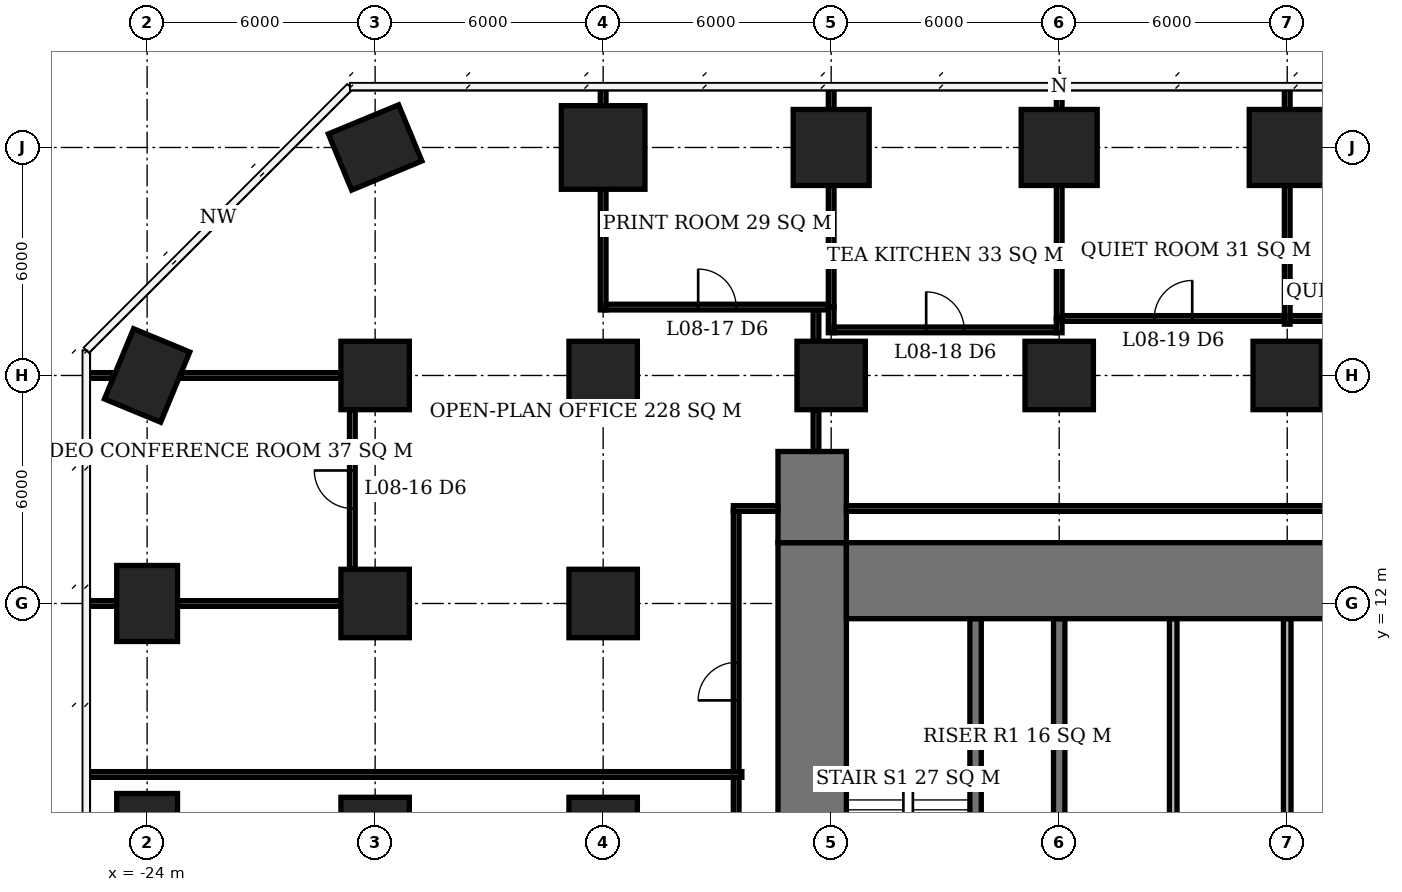
"""IFC4 building model, lengths in metres.
Left out: names, types, materials, properties, quantities, classifications, styles, units other than length and angle.
Written with IfcOpenShell. Run it as: python <this file> out.ifc"""

import sys

from ifc_helpers import new_model, si_unit, direction, frame, frame_2d, origin, origin_2d, place, context, subcontext, project, spatial, rectangle, extrude, element, fill, save


model = new_model("IFC4")
c1 = context("Model", 3, precision=1e-05, world=origin(), true_north=direction((0.0, 1.0)))
c2 = subcontext(c1, "Body", "Model", "MODEL_VIEW")
j1 = project(units=[si_unit("LENGTHUNIT", "METRE"), si_unit("PLANEANGLEUNIT", "RADIAN")], contexts=[c1])
p1 = place(None, origin())
s1 = spatial("IfcSite", under=j1, at=p1, CompositionType="ELEMENT")
p2 = place(p1, origin())
s2 = spatial("IfcBuilding", under=s1, at=p2, CompositionType="ELEMENT")
p3 = place(p2, frame((0.0, 0.0, 37.7)))
s3 = spatial("IfcBuildingStorey", under=s2, at=p3, CompositionType="ELEMENT", Elevation=37.7)
for number, where, z_axis, x_axis in (
    (1, (-24.0, 6.0, 0.0), (0.0, 0.0, 1.0), (0.0, 1.0, 0.0)),
    (2, (-24.0, 12.0, 0.0), (0.0, 0.0, 1.0), (0.0, 1.0, 0.0)),
    (3, (-24.0, 18.0, 0.0), (0.0, 0.0, 1.0), (0.383, 0.924, 0.0)),
):
    element("IfcColumn", number, at=place(p3, frame(where, z_axis=z_axis, x_axis=x_axis)), inside=s3, PredefinedType="COLUMN", context=c2, shape_type="SweptSolid", body=[
        extrude(rectangle(XDim=2.0, YDim=1.6, at=origin_2d()), origin(), (0.0, 0.0, 1.0), 3.9),
    ])
for number, where, z_axis, x_axis in (
    (4, (-18.0, 6.0, 0.0), (0.0, 0.0, 1.0), (1.0, 0.0, 0.0)),
    (5, (-18.0, 12.0, 0.0), (0.0, 0.0, 1.0), (1.0, 0.0, 0.0)),
    (6, (-18.0, 18.0, 0.0), (0.0, 0.0, 1.0), (1.0, 0.0, 0.0)),
):
    element("IfcColumn", number, at=place(p3, frame(where, z_axis=z_axis, x_axis=x_axis)), inside=s3, PredefinedType="COLUMN", context=c2, shape_type="SweptSolid", body=[
        extrude(rectangle(XDim=1.8, YDim=1.8, at=origin_2d()), origin(), (0.0, 0.0, 1.0), 3.9),
    ])
p4 = place(p3, frame((-18.0, 24.0, 0.0), z_axis=(0.0, 0.0, 1.0), x_axis=(0.923879532511, 0.382683432365, 0.0)))
e7 = element("IfcColumn", 7, at=p4, inside=s3, PredefinedType="COLUMN", context=c2, shape_type="SweptSolid", body=[
    extrude(rectangle(XDim=2.0, YDim=1.6, at=origin_2d()), origin(), (0.0, 0.0, 1.0), 3.9),
])
for number, where, z_axis, x_axis in (
    (8, (-12.0, 6.0, 0.0), (0.0, 0.0, 1.0), (1.0, 0.0, 0.0)),
    (9, (-12.0, 12.0, 0.0), (0.0, 0.0, 1.0), (1.0, 0.0, 0.0)),
    (10, (-12.0, 18.0, 0.0), (0.0, 0.0, 1.0), (1.0, 0.0, 0.0)),
):
    element("IfcColumn", number, at=place(p3, frame(where, z_axis=z_axis, x_axis=x_axis)), inside=s3, PredefinedType="COLUMN", context=c2, shape_type="SweptSolid", body=[
        extrude(rectangle(XDim=1.8, YDim=1.8, at=origin_2d()), origin(), (0.0, 0.0, 1.0), 3.9),
    ])
p5 = place(p3, frame((-12.0, 24.0, 0.0), z_axis=(0.0, 0.0, 1.0), x_axis=(1.0, 0.0, 0.0)))
e11 = element("IfcColumn", 11, at=p5, inside=s3, PredefinedType="COLUMN", context=c2, shape_type="SweptSolid", body=[
    extrude(rectangle(XDim=2.2, YDim=2.2, at=origin_2d()), origin(), (0.0, 0.0, 1.0), 3.9),
])
p6 = place(p3, frame((-6.0, 18.0, 0.0), z_axis=(0.0, 0.0, 1.0), x_axis=(1.0, 0.0, 0.0)))
e12 = element("IfcColumn", 12, at=p6, inside=s3, PredefinedType="COLUMN", context=c2, shape_type="SweptSolid", body=[
    extrude(rectangle(XDim=1.8, YDim=1.8, at=origin_2d()), origin(), (0.0, 0.0, 1.0), 3.9),
])
p7 = place(p3, frame((-6.0, 24.0, 0.0), z_axis=(0.0, 0.0, 1.0), x_axis=(1.0, 0.0, 0.0)))
e13 = element("IfcColumn", 13, at=p7, inside=s3, PredefinedType="COLUMN", context=c2, shape_type="SweptSolid", body=[
    extrude(rectangle(XDim=2.0, YDim=2.0, at=origin_2d()), origin(), (0.0, 0.0, 1.0), 3.9),
])
p8 = place(p3, frame((0.0, 18.0, 0.0), z_axis=(0.0, 0.0, 1.0), x_axis=(1.0, 0.0, 0.0)))
e14 = element("IfcColumn", 14, at=p8, inside=s3, PredefinedType="COLUMN", context=c2, shape_type="SweptSolid", body=[
    extrude(rectangle(XDim=1.8, YDim=1.8, at=origin_2d()), origin(), (0.0, 0.0, 1.0), 3.9),
])
p9 = place(p3, frame((0.0, 24.0, 0.0), z_axis=(0.0, 0.0, 1.0), x_axis=(1.0, 0.0, 0.0)))
e15 = element("IfcColumn", 15, at=p9, inside=s3, PredefinedType="COLUMN", context=c2, shape_type="SweptSolid", body=[
    extrude(rectangle(XDim=2.0, YDim=2.0, at=origin_2d()), origin(), (0.0, 0.0, 1.0), 3.9),
])
p10 = place(p3, frame((6.0, 18.0, 0.0), z_axis=(0.0, 0.0, 1.0), x_axis=(1.0, 0.0, 0.0)))
e16 = element("IfcColumn", 16, at=p10, inside=s3, PredefinedType="COLUMN", context=c2, shape_type="SweptSolid", body=[
    extrude(rectangle(XDim=1.8, YDim=1.8, at=origin_2d()), origin(), (0.0, 0.0, 1.0), 3.9),
])
p11 = place(p3, frame((6.0, 24.0, 0.0), z_axis=(0.0, 0.0, 1.0), x_axis=(1.0, 0.0, 0.0)))
e17 = element("IfcColumn", 17, at=p11, inside=s3, PredefinedType="COLUMN", context=c2, shape_type="SweptSolid", body=[
    extrude(rectangle(XDim=2.0, YDim=2.0, at=origin_2d()), origin(), (0.0, 0.0, 1.0), 3.9),
])
p12 = place(p3, frame((-5.6, 12.6, 0.0), z_axis=(0.0, 0.0, 1.0), x_axis=(1.0, 0.0, 0.0)))
e18 = element("IfcWall", 18, at=p12, inside=s3, PredefinedType="SHEAR", context=c2, shape_type="SweptSolid", body=[
    extrude(rectangle(XDim=23.2, YDim=2.0, at=frame_2d((11.6, 0.0))), origin(), (0.0, 0.0, 1.0), 3.9),
])
p13 = place(p3, frame((-6.5, -7.6, 0.0), z_axis=(0.0, 0.0, 1.0), x_axis=(0.0, 1.0, 0.0)))
e19 = element("IfcWall", 19, at=p13, inside=s3, PredefinedType="SHEAR", context=c2, shape_type="SweptSolid", body=[
    extrude(rectangle(XDim=21.2, YDim=1.8, at=frame_2d((10.6, 0.0))), origin(), (0.0, 0.0, 1.0), 3.9),
])
p14 = place(p13, frame((7.8, 0.0, 0.0)))
e20 = element("IfcOpeningElement", 20, at=p14, cuts=e19, PredefinedType="OPENING", context=c2, shape_type="SweptSolid", body=[
    extrude(rectangle(XDim=1.8, YDim=2.4, at=frame_2d((0.9, 1.2))), frame((0.0, 0.91, 0.0), z_axis=(0.0, -1.0, 0.0), x_axis=(1.0, 0.0, 0.0)), (0.0, 0.0, 1.0), 1.82),
])
p15 = place(p3, frame((-6.5, 13.6, 0.0), z_axis=(0.0, 0.0, 1.0), x_axis=(0.0, 1.0, 0.0)))
e21 = element("IfcWall", 21, at=p15, inside=s3, PredefinedType="SHEAR", context=c2, shape_type="SweptSolid", body=[
    extrude(rectangle(XDim=2.4, YDim=1.8, at=frame_2d((1.2, 0.0))), origin(), (0.0, 0.0, 1.0), 3.9),
])
for number, where, z_axis, x_axis in (
    (22, (0.0, 3.15, 0.0), (0.0, 0.0, 1.0), (0.0, 1.0, 0.0)),
    (23, (-2.2, 3.15, 0.0), (0.0, 0.0, 1.0), (0.0, 1.0, 0.0)),
):
    element("IfcWall", number, at=place(p3, frame(where, z_axis=z_axis, x_axis=x_axis)), inside=s3, PredefinedType="SHEAR", context=c2, shape_type="SweptSolid", body=[
        extrude(rectangle(XDim=8.45, YDim=0.3, at=frame_2d((4.225, 0.0))), origin(), (0.0, 0.0, 1.0), 3.9),
    ])
for number, where, z_axis, x_axis in (
    (24, (3.0, 6.15, 0.0), (0.0, 0.0, 1.0), (0.0, 1.0, 0.0)),
    (25, (6.0, 6.15, 0.0), (0.0, 0.0, 1.0), (0.0, 1.0, 0.0)),
):
    element("IfcWall", number, at=place(p3, frame(where, z_axis=z_axis, x_axis=x_axis)), inside=s3, PredefinedType="SOLIDWALL", context=c2, shape_type="SweptSolid", body=[
        extrude(rectangle(XDim=5.45, YDim=0.2, at=frame_2d((2.725, 0.0))), origin(), (0.0, 0.0, 1.0), 3.9),
    ])
p16 = place(p3, frame((-25.6, 12.0, 0.0), z_axis=(0.0, 0.0, 1.0), x_axis=(1.0, 0.0, 0.0)))
e26 = element("IfcWall", 26, at=p16, inside=s3, PredefinedType="PARTITIONING", context=c2, shape_type="SweptSolid", body=[
    extrude(rectangle(XDim=0.8, YDim=0.15, at=frame_2d((0.4, 0.0))), origin(), (0.0, 0.0, 1.0), 3.65),
])
p17 = place(p3, frame((-23.2, 12.0, 0.0), z_axis=(0.0, 0.0, 1.0), x_axis=(1.0, 0.0, 0.0)))
e27 = element("IfcWall", 27, at=p17, inside=s3, PredefinedType="PARTITIONING", context=c2, shape_type="SweptSolid", body=[
    extrude(rectangle(XDim=4.3, YDim=0.15, at=frame_2d((2.15, 0.0))), origin(), (0.0, 0.0, 1.0), 3.65),
])
p18 = place(p3, frame((-25.6, 18.0, 0.0), z_axis=(0.0, 0.0, 1.0), x_axis=(1.0, 0.0, 0.0)))
e28 = element("IfcWall", 28, at=p18, inside=s3, PredefinedType="PARTITIONING", context=c2, shape_type="SweptSolid", body=[
    extrude(rectangle(XDim=0.703, YDim=0.15, at=frame_2d((0.352, 0.0))), origin(), (0.0, 0.0, 1.0), 3.65),
])
p19 = place(p3, frame((-23.103, 18.0, 0.0), z_axis=(0.0, 0.0, 1.0), x_axis=(1.0, 0.0, 0.0)))
e29 = element("IfcWall", 29, at=p19, inside=s3, PredefinedType="PARTITIONING", context=c2, shape_type="SweptSolid", body=[
    extrude(rectangle(XDim=4.203, YDim=0.15, at=frame_2d((2.102, 0.0))), origin(), (0.0, 0.0, 1.0), 3.65),
])
p20 = place(p3, frame((-5.925, 19.2, 0.0), z_axis=(0.0, 0.0, 1.0), x_axis=(1.0, 0.0, 0.0)))
e30 = element("IfcWall", 30, at=p20, inside=s3, PredefinedType="PARTITIONING", context=c2, shape_type="SweptSolid", body=[
    extrude(rectangle(XDim=5.85, YDim=0.15, at=frame_2d((2.925, 0.0))), origin(), (0.0, 0.0, 1.0), 3.65),
])
p21 = place(p20, frame((2.425, 0.0, 0.0)))
e31 = element("IfcOpeningElement", 31, at=p21, cuts=e30, PredefinedType="OPENING", context=c2, shape_type="SweptSolid", body=[
    extrude(rectangle(XDim=1.0, YDim=2.1, at=frame_2d((0.5, 1.05))), frame((0.0, 0.085, 0.0), z_axis=(0.0, -1.0, 0.0), x_axis=(1.0, 0.0, 0.0)), (0.0, 0.0, 1.0), 0.17),
])
p22 = place(p3, frame((0.075, 19.5, 0.0), z_axis=(0.0, 0.0, 1.0), x_axis=(1.0, 0.0, 0.0)))
e32 = element("IfcWall", 32, at=p22, inside=s3, PredefinedType="PARTITIONING", context=c2, shape_type="SweptSolid", body=[
    extrude(rectangle(XDim=5.85, YDim=0.15, at=frame_2d((2.925, 0.0))), origin(), (0.0, 0.0, 1.0), 3.65),
])
p23 = place(p22, frame((2.425, 0.0, 0.0)))
e33 = element("IfcOpeningElement", 33, at=p23, cuts=e32, PredefinedType="OPENING", context=c2, shape_type="SweptSolid", body=[
    extrude(rectangle(XDim=1.0, YDim=2.1, at=frame_2d((0.5, 1.05))), frame((0.0, 0.085, 0.0), z_axis=(0.0, -1.0, 0.0), x_axis=(1.0, 0.0, 0.0)), (0.0, 0.0, 1.0), 0.17),
])
p24 = place(p3, frame((6.075, 19.5, 0.0), z_axis=(0.0, 0.0, 1.0), x_axis=(1.0, 0.0, 0.0)))
e34 = element("IfcWall", 34, at=p24, inside=s3, PredefinedType="PARTITIONING", context=c2, shape_type="SweptSolid", body=[
    extrude(rectangle(XDim=5.85, YDim=0.15, at=frame_2d((2.925, 0.0))), origin(), (0.0, 0.0, 1.0), 3.65),
])
p25 = place(p24, frame((2.425, 0.0, 0.0)))
e35 = element("IfcOpeningElement", 35, at=p25, cuts=e34, PredefinedType="OPENING", context=c2, shape_type="SweptSolid", body=[
    extrude(rectangle(XDim=1.0, YDim=2.1, at=frame_2d((0.5, 1.05))), frame((0.0, 0.085, 0.0), z_axis=(0.0, -1.0, 0.0), x_axis=(1.0, 0.0, 0.0)), (0.0, 0.0, 1.0), 0.17),
])
p26 = place(p3, frame((-11.925, 19.8, 0.0), z_axis=(0.0, 0.0, 1.0), x_axis=(1.0, 0.0, 0.0)))
e36 = element("IfcWall", 36, at=p26, inside=s3, PredefinedType="PARTITIONING", context=c2, shape_type="SweptSolid", body=[
    extrude(rectangle(XDim=5.85, YDim=0.15, at=frame_2d((2.925, 0.0))), origin(), (0.0, 0.0, 1.0), 3.65),
])
p27 = place(p26, frame((2.425, 0.0, 0.0)))
e37 = element("IfcOpeningElement", 37, at=p27, cuts=e36, PredefinedType="OPENING", context=c2, shape_type="SweptSolid", body=[
    extrude(rectangle(XDim=1.0, YDim=2.1, at=frame_2d((0.5, 1.05))), frame((0.0, 0.085, 0.0), z_axis=(0.0, -1.0, 0.0), x_axis=(1.0, 0.0, 0.0)), (0.0, 0.0, 1.0), 0.17),
])
p28 = place(p3, frame((-18.6, 12.9, 0.0), z_axis=(0.0, 0.0, 1.0), x_axis=(0.0, 1.0, 0.0)))
e38 = element("IfcWall", 38, at=p28, inside=s3, PredefinedType="PARTITIONING", context=c2, shape_type="SweptSolid", body=[
    extrude(rectangle(XDim=4.2, YDim=0.15, at=frame_2d((2.1, 0.0))), origin(), (0.0, 0.0, 1.0), 3.65),
])
p29 = place(p28, frame((1.6, 0.0, 0.0)))
e39 = element("IfcOpeningElement", 39, at=p29, cuts=e38, PredefinedType="OPENING", context=c2, shape_type="SweptSolid", body=[
    extrude(rectangle(XDim=1.0, YDim=2.1, at=frame_2d((0.5, 1.05))), frame((0.0, 0.085, 0.0), z_axis=(0.0, -1.0, 0.0), x_axis=(1.0, 0.0, 0.0)), (0.0, 0.0, 1.0), 0.17),
])
p30 = place(p3, frame((-12.0, 19.725, 0.0), z_axis=(0.0, 0.0, 1.0), x_axis=(0.0, 1.0, 0.0)))
e40 = element("IfcWall", 40, at=p30, inside=s3, PredefinedType="PARTITIONING", context=c2, shape_type="SweptSolid", body=[
    extrude(rectangle(XDim=3.175, YDim=0.15, at=frame_2d((1.587, 0.0))), origin(), (0.0, 0.0, 1.0), 3.65),
])
p31 = place(p3, frame((-12.0, 25.1, 0.0), z_axis=(0.0, 0.0, 1.0), x_axis=(0.0, 1.0, 0.0)))
e41 = element("IfcWall", 41, at=p31, inside=s3, PredefinedType="PARTITIONING", context=c2, shape_type="SweptSolid", body=[
    extrude(rectangle(XDim=0.5, YDim=0.15, at=frame_2d((0.25, 0.0))), origin(), (0.0, 0.0, 1.0), 3.65),
])
p32 = place(p3, frame((-6.0, 19.125, 0.0), z_axis=(0.0, 0.0, 1.0), x_axis=(0.0, 1.0, 0.0)))
e42 = element("IfcWall", 42, at=p32, inside=s3, PredefinedType="PARTITIONING", context=c2, shape_type="SweptSolid", body=[
    extrude(rectangle(XDim=0.675, YDim=0.15, at=frame_2d((0.337, 0.0))), origin(), (0.0, 0.0, 1.0), 3.65),
])
p33 = place(p3, frame((-6.0, 19.8, 0.0), z_axis=(0.0, 0.0, 1.0), x_axis=(0.0, 1.0, 0.0)))
e43 = element("IfcWall", 43, at=p33, inside=s3, PredefinedType="PARTITIONING", context=c2, shape_type="SweptSolid", body=[
    extrude(rectangle(XDim=3.2, YDim=0.15, at=frame_2d((1.6, 0.0))), origin(), (0.0, 0.0, 1.0), 3.65),
])
p34 = place(p3, frame((-6.0, 25.0, 0.0), z_axis=(0.0, 0.0, 1.0), x_axis=(0.0, 1.0, 0.0)))
e44 = element("IfcWall", 44, at=p34, inside=s3, PredefinedType="PARTITIONING", context=c2, shape_type="SweptSolid", body=[
    extrude(rectangle(XDim=0.6, YDim=0.15, at=frame_2d((0.3, 0.0))), origin(), (0.0, 0.0, 1.0), 3.65),
])
p35 = place(p3, frame((0.0, 19.125, 0.0), z_axis=(0.0, 0.0, 1.0), x_axis=(0.0, 1.0, 0.0)))
e45 = element("IfcWall", 45, at=p35, inside=s3, PredefinedType="PARTITIONING", context=c2, shape_type="SweptSolid", body=[
    extrude(rectangle(XDim=0.375, YDim=0.15, at=frame_2d((0.188, 0.0))), origin(), (0.0, 0.0, 1.0), 3.65),
])
p36 = place(p3, frame((0.0, 19.5, 0.0), z_axis=(0.0, 0.0, 1.0), x_axis=(0.0, 1.0, 0.0)))
e46 = element("IfcWall", 46, at=p36, inside=s3, PredefinedType="PARTITIONING", context=c2, shape_type="SweptSolid", body=[
    extrude(rectangle(XDim=3.5, YDim=0.15, at=frame_2d((1.75, 0.0))), origin(), (0.0, 0.0, 1.0), 3.65),
])
p37 = place(p3, frame((0.0, 25.0, 0.0), z_axis=(0.0, 0.0, 1.0), x_axis=(0.0, 1.0, 0.0)))
e47 = element("IfcWall", 47, at=p37, inside=s3, PredefinedType="PARTITIONING", context=c2, shape_type="SweptSolid", body=[
    extrude(rectangle(XDim=0.55, YDim=0.15, at=frame_2d((0.275, 0.0))), origin(), (0.0, 0.0, 1.0), 3.65),
])
p38 = place(p3, frame((6.0, 19.35, 0.0), z_axis=(0.0, 0.0, 1.0), x_axis=(0.0, 1.0, 0.0)))
e48 = element("IfcWall", 48, at=p38, inside=s3, PredefinedType="PARTITIONING", context=c2, shape_type="SweptSolid", body=[
    extrude(rectangle(XDim=3.65, YDim=0.15, at=frame_2d((1.825, 0.0))), origin(), (0.0, 0.0, 1.0), 3.65),
])
p39 = place(p3, frame((6.0, 25.0, 0.0), z_axis=(0.0, 0.0, 1.0), x_axis=(0.0, 1.0, 0.0)))
e49 = element("IfcWall", 49, at=p39, inside=s3, PredefinedType="PARTITIONING", context=c2, shape_type="SweptSolid", body=[
    extrude(rectangle(XDim=0.6, YDim=0.15, at=frame_2d((0.3, 0.0))), origin(), (0.0, 0.0, 1.0), 3.65),
])
p40 = place(p3, frame((-25.6, 7.5, 0.0), z_axis=(0.0, 0.0, 1.0), x_axis=(1.0, 0.0, 0.0)))
e50 = element("IfcWall", 50, at=p40, inside=s3, PredefinedType="PARTITIONING", context=c2, shape_type="SweptSolid", body=[
    extrude(rectangle(XDim=17.25, YDim=0.15, at=frame_2d((8.625, 0.0))), origin(), (0.0, 0.0, 1.0), 3.65),
])
p41 = place(p3, frame((-8.5, -1.425, 0.0), z_axis=(0.0, 0.0, 1.0), x_axis=(0.0, 1.0, 0.0)))
e51 = element("IfcWall", 51, at=p41, inside=s3, PredefinedType="PARTITIONING", context=c2, shape_type="SweptSolid", body=[
    extrude(rectangle(XDim=8.85, YDim=0.15, at=frame_2d((4.425, 0.0))), origin(), (0.0, 0.0, 1.0), 3.65),
])
p42 = place(p41, frame((2.575, 0.0, 0.0)))
e52 = element("IfcOpeningElement", 52, at=p42, cuts=e51, PredefinedType="OPENING", context=c2, shape_type="SweptSolid", body=[
    extrude(rectangle(XDim=1.0, YDim=2.1, at=frame_2d((0.5, 1.05))), frame((0.0, 0.085, 0.0), z_axis=(0.0, -1.0, 0.0), x_axis=(1.0, 0.0, 0.0)), (0.0, 0.0, 1.0), 0.17),
])
p43 = place(p3, frame((-8.5, 7.575, 0.0), z_axis=(0.0, 0.0, 1.0), x_axis=(0.0, 1.0, 0.0)))
e53 = element("IfcWall", 53, at=p43, inside=s3, PredefinedType="PARTITIONING", context=c2, shape_type="SweptSolid", body=[
    extrude(rectangle(XDim=6.85, YDim=0.15, at=frame_2d((3.425, 0.0))), origin(), (0.0, 0.0, 1.0), 3.65),
])
p44 = place(p43, frame((1.875, 0.0, 0.0)))
e54 = element("IfcOpeningElement", 54, at=p44, cuts=e53, PredefinedType="OPENING", context=c2, shape_type="SweptSolid", body=[
    extrude(rectangle(XDim=1.0, YDim=2.1, at=frame_2d((0.5, 1.05))), frame((0.0, 0.085, 0.0), z_axis=(0.0, -1.0, 0.0), x_axis=(1.0, 0.0, 0.0)), (0.0, 0.0, 1.0), 0.17),
])
p45 = place(p3, frame((-8.575, 14.5, 0.0), z_axis=(0.0, 0.0, 1.0), x_axis=(1.0, 0.0, 0.0)))
e55 = element("IfcWall", 55, at=p45, inside=s3, PredefinedType="PARTITIONING", context=c2, shape_type="SweptSolid", body=[
    extrude(rectangle(XDim=1.175, YDim=0.15, at=frame_2d((0.587, 0.0))), origin(), (0.0, 0.0, 1.0), 3.65),
])
p46 = place(p3, frame((-6.4, 16.0, 0.0), z_axis=(0.0, 0.0, 1.0), x_axis=(0.0, 1.0, 0.0)))
e56 = element("IfcWall", 56, at=p46, inside=s3, PredefinedType="PARTITIONING", context=c2, shape_type="SweptSolid", body=[
    extrude(rectangle(XDim=1.1, YDim=0.15, at=frame_2d((0.55, 0.0))), origin(), (0.0, 0.0, 1.0), 3.65),
])
p47 = place(p3, frame((-6.4, 18.9, 0.0), z_axis=(0.0, 0.0, 1.0), x_axis=(0.0, 1.0, 0.0)))
e57 = element("IfcWall", 57, at=p47, inside=s3, PredefinedType="PARTITIONING", context=c2, shape_type="SweptSolid", body=[
    extrude(rectangle(XDim=0.825, YDim=0.15, at=frame_2d((0.413, 0.0))), origin(), (0.0, 0.0, 1.0), 3.65),
])
p48 = place(p3, frame((-5.6, 14.5, 0.0), z_axis=(0.0, 0.0, 1.0), x_axis=(1.0, 0.0, 0.0)))
e58 = element("IfcWall", 58, at=p48, inside=s3, PredefinedType="PARTITIONING", context=c2, shape_type="SweptSolid", body=[
    extrude(rectangle(XDim=23.2, YDim=0.15, at=frame_2d((11.6, 0.0))), origin(), (0.0, 0.0, 1.0), 3.65),
])
p49 = place(p48, frame((14.58, 0.0, 0.0)))
e59 = element("IfcOpeningElement", 59, at=p49, cuts=e58, PredefinedType="OPENING", context=c2, shape_type="SweptSolid", body=[
    extrude(rectangle(XDim=1.0, YDim=2.1, at=frame_2d((0.5, 1.05))), frame((0.0, 0.085, 0.0), z_axis=(0.0, -1.0, 0.0), x_axis=(1.0, 0.0, 0.0)), (0.0, 0.0, 1.0), 0.17),
])
p50 = place(p29, origin())
e60 = element("IfcDoor", 60, at=p50, inside=s3, OperationType="SINGLE_SWING_RIGHT", PredefinedType="DOOR", context=c2, shape_type="SweptSolid", body=[
    extrude(rectangle(XDim=1.0, YDim=2.1, at=frame_2d((0.5, 1.05))), frame((0.0, 0.025, 0.0), z_axis=(0.0, -1.0, 0.0), x_axis=(1.0, 0.0, 0.0)), (0.0, 0.0, 1.0), 0.05),
])
fill(e39, e60)
p51 = place(p27, origin())
e61 = element("IfcDoor", 61, at=p51, inside=s3, OperationType="SINGLE_SWING_LEFT", PredefinedType="DOOR", context=c2, shape_type="SweptSolid", body=[
    extrude(rectangle(XDim=1.0, YDim=2.1, at=frame_2d((0.5, 1.05))), frame((0.0, 0.025, 0.0), z_axis=(0.0, -1.0, 0.0), x_axis=(1.0, 0.0, 0.0)), (0.0, 0.0, 1.0), 0.05),
])
fill(e37, e61)
p52 = place(p21, origin())
e62 = element("IfcDoor", 62, at=p52, inside=s3, OperationType="SINGLE_SWING_LEFT", PredefinedType="DOOR", context=c2, shape_type="SweptSolid", body=[
    extrude(rectangle(XDim=1.0, YDim=2.1, at=frame_2d((0.5, 1.05))), frame((0.0, 0.025, 0.0), z_axis=(0.0, -1.0, 0.0), x_axis=(1.0, 0.0, 0.0)), (0.0, 0.0, 1.0), 0.05),
])
fill(e31, e62)
p53 = place(p23, origin())
e63 = element("IfcDoor", 63, at=p53, inside=s3, OperationType="SINGLE_SWING_RIGHT", PredefinedType="DOOR", context=c2, shape_type="SweptSolid", body=[
    extrude(rectangle(XDim=1.0, YDim=2.1, at=frame_2d((0.5, 1.05))), frame((0.0, 0.025, 0.0), z_axis=(0.0, -1.0, 0.0), x_axis=(1.0, 0.0, 0.0)), (0.0, 0.0, 1.0), 0.05),
])
fill(e33, e63)
p54 = place(p44, origin())
e64 = element("IfcDoor", 64, at=p54, inside=s3, OperationType="SINGLE_SWING_LEFT", PredefinedType="DOOR", context=c2, shape_type="SweptSolid", body=[
    extrude(rectangle(XDim=1.0, YDim=2.1, at=frame_2d((0.5, 1.05))), frame((0.0, 0.025, 0.0), z_axis=(0.0, -1.0, 0.0), x_axis=(1.0, 0.0, 0.0)), (0.0, 0.0, 1.0), 0.05),
])
fill(e54, e64)
save(model, sys.argv[1])
